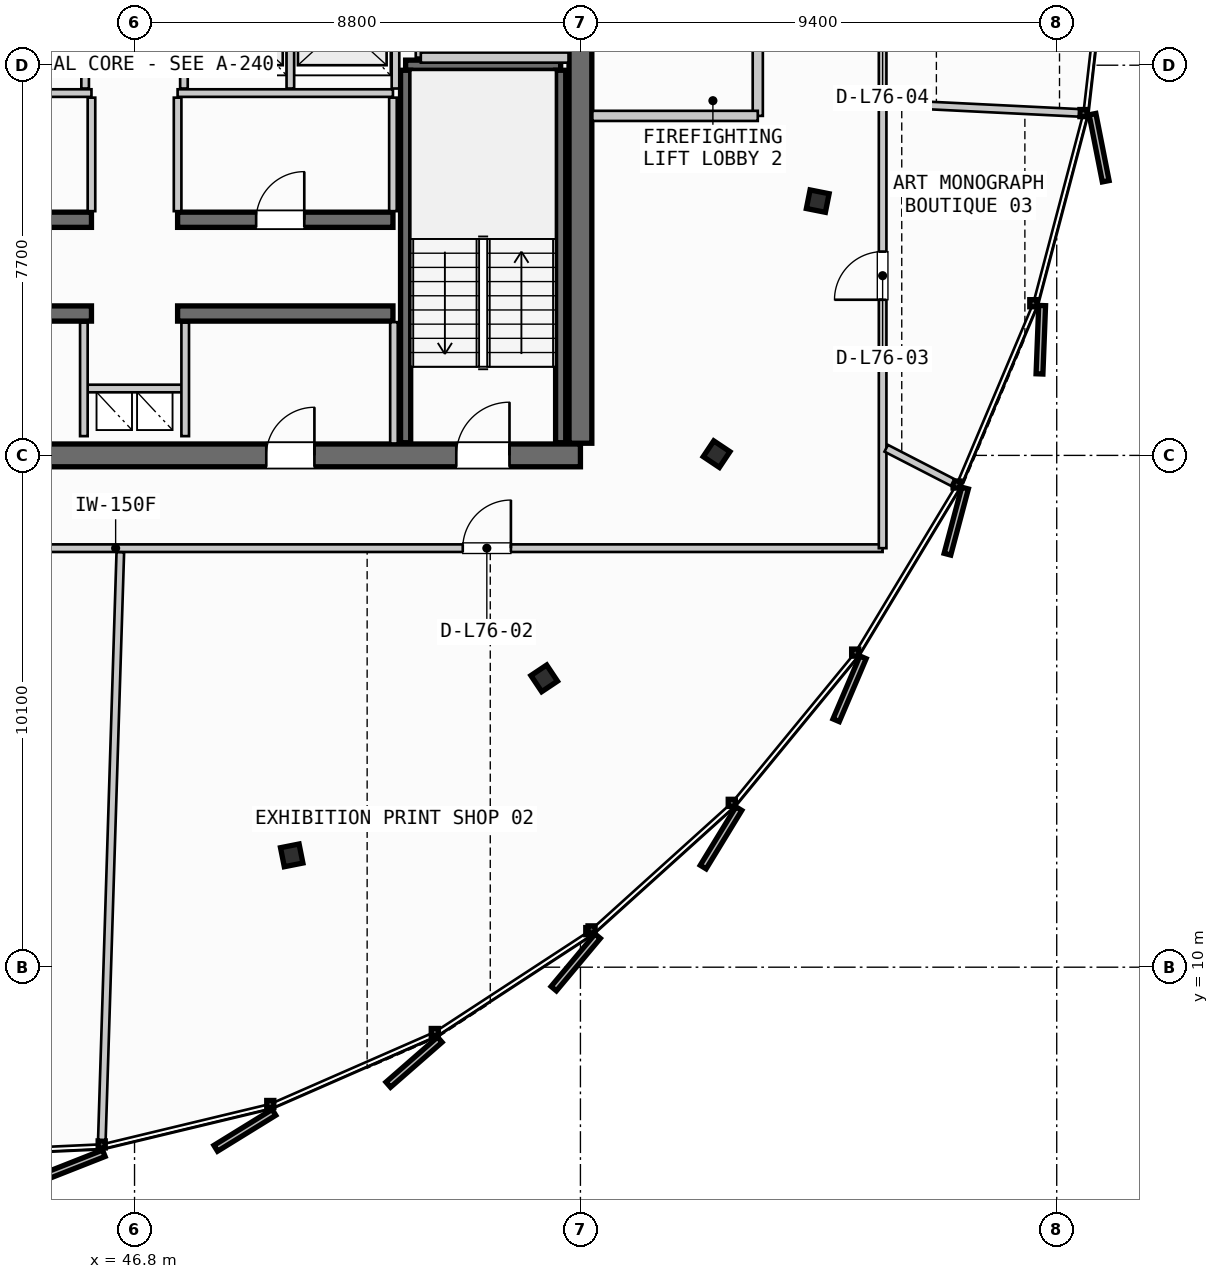
"""IFC4 building model, lengths in metres.
Left out: names, types, materials, properties, quantities, classifications, styles, units other than length and angle.
Written with IfcOpenShell. Run it as: python <this file> out.ifc"""

import sys

from ifc_helpers import new_model, si_unit, direction, frame, frame_2d, origin, origin_2d, place, context, subcontext, project, spatial, rectangle, i_section, extrude, source, transform, mapped, element, fill, save


model = new_model("IFC4")
c1 = context("Model", 3, precision=1e-05, world=origin(), true_north=direction((0.0, 1.0)))
c2 = subcontext(c1, "Body", "Model", "MODEL_VIEW")
j1 = project(units=[si_unit("LENGTHUNIT", "METRE"), si_unit("PLANEANGLEUNIT", "RADIAN")], contexts=[c1])
p1 = place(None, origin())
s1 = spatial("IfcSite", under=j1, at=p1, CompositionType="ELEMENT")
p2 = place(p1, origin())
s2 = spatial("IfcBuilding", under=s1, at=p2, CompositionType="ELEMENT")
p3 = place(p2, frame((0.0, 0.0, 287.05)))
s3 = spatial("IfcBuildingStorey", under=s2, at=p3, CompositionType="ELEMENT", Elevation=287.05)
p4 = place(p3, frame((38.0, 20.1, 0.0), z_axis=(0.0, 0.0, 1.0), x_axis=(1.0, 0.0, 0.0)))
e1 = element("IfcWall", 1, at=p4, inside=s3, PredefinedType="SHEAR", context=c2, shape_type="SweptSolid", body=[
    extrude(rectangle(XDim=17.6, YDim=0.45, at=frame_2d((8.8, 0.0))), origin(), (0.0, 0.0, 1.0), 3.21),
])
p5 = place(p4, frame((1.4, 0.0, 0.0)))
e2 = element("IfcOpeningElement", 2, at=p5, cuts=e1, PredefinedType="OPENING", context=c2, shape_type="SweptSolid", body=[
    extrude(rectangle(XDim=1.05, YDim=2.15, at=frame_2d((0.525, 1.075))), frame((0.0, 0.235, 0.0), z_axis=(0.0, -1.0, 0.0), x_axis=(1.0, 0.0, 0.0)), (0.0, 0.0, 1.0), 0.47),
])
p6 = place(p4, frame((15.15, 0.0, 0.0)))
e3 = element("IfcOpeningElement", 3, at=p6, cuts=e1, PredefinedType="OPENING", context=c2, shape_type="SweptSolid", body=[
    extrude(rectangle(XDim=1.05, YDim=2.15, at=frame_2d((0.525, 1.075))), frame((0.0, 0.235, 0.0), z_axis=(0.0, -1.0, 0.0), x_axis=(1.0, 0.0, 0.0)), (0.0, 0.0, 1.0), 0.47),
])
p7 = place(p4, frame((5.25, 0.0, 0.0)))
e4 = element("IfcOpeningElement", 4, at=p7, cuts=e1, PredefinedType="OPENING", context=c2, shape_type="SweptSolid", body=[
    extrude(rectangle(XDim=0.95, YDim=2.15, at=frame_2d((0.475, 1.075))), frame((0.0, 0.235, 0.0), z_axis=(0.0, -1.0, 0.0), x_axis=(1.0, 0.0, 0.0)), (0.0, 0.0, 1.0), 0.47),
])
p8 = place(p4, frame((11.4, 0.0, 0.0)))
e5 = element("IfcOpeningElement", 5, at=p8, cuts=e1, PredefinedType="OPENING", context=c2, shape_type="SweptSolid", body=[
    extrude(rectangle(XDim=0.95, YDim=2.15, at=frame_2d((0.475, 1.075))), frame((0.0, 0.235, 0.0), z_axis=(0.0, -1.0, 0.0), x_axis=(1.0, 0.0, 0.0)), (0.0, 0.0, 1.0), 0.47),
])
p9 = place(p3, frame((55.6, 20.34, 0.0), z_axis=(0.0, 0.0, 1.0), x_axis=(0.0, 1.0, 0.0)))
e6 = element("IfcWall", 6, at=p9, inside=s3, PredefinedType="SHEAR", context=c2, shape_type="SweptSolid", body=[
    extrude(rectangle(XDim=14.92, YDim=0.45, at=frame_2d((7.46, 0.0))), origin(), (0.0, 0.0, 1.0), 3.21),
])
p10 = place(p9, frame((12.71, 0.0, 0.0)))
e7 = element("IfcOpeningElement", 7, at=p10, cuts=e6, PredefinedType="OPENING", context=c2, shape_type="SweptSolid", body=[
    extrude(rectangle(XDim=1.05, YDim=2.15, at=frame_2d((0.525, 1.075))), frame((0.0, 0.235, 0.0), z_axis=(0.0, -1.0, 0.0), x_axis=(1.0, 0.0, 0.0)), (0.0, 0.0, 1.0), 0.47),
])
p11 = place(p9, frame((8.61, 0.0, 0.0)))
e8 = element("IfcOpeningElement", 8, at=p11, cuts=e6, PredefinedType="OPENING", context=c2, shape_type="SweptSolid", body=[
    extrude(rectangle(XDim=1.1, YDim=2.2, at=frame_2d((0.55, 1.1))), frame((0.0, 0.235, 0.0), z_axis=(0.0, -1.0, 0.0), x_axis=(1.0, 0.0, 0.0)), (0.0, 0.0, 1.0), 0.47),
])
for number, where, z_axis, x_axis in (
    (9, (41.7, 22.9, 0.0), (0.0, 0.0, 1.0), (1.0, 0.0, 0.0)),
    (10, (47.65, 22.9, 0.0), (0.0, 0.0, 1.0), (1.0, 0.0, 0.0)),
):
    element("IfcWall", number, at=place(p3, frame(where, z_axis=z_axis, x_axis=x_axis)), inside=s3, PredefinedType="SHEAR", context=c2, shape_type="SweptSolid", body=[
        extrude(rectangle(XDim=4.25, YDim=0.3, at=frame_2d((2.125, 0.0))), origin(), (0.0, 0.0, 1.0), 3.21),
    ])
p12 = place(p3, frame((41.7, 24.75, 0.0), z_axis=(0.0, 0.0, 1.0), x_axis=(1.0, 0.0, 0.0)))
e11 = element("IfcWall", 11, at=p12, inside=s3, PredefinedType="SHEAR", context=c2, shape_type="SweptSolid", body=[
    extrude(rectangle(XDim=4.25, YDim=0.3, at=frame_2d((2.125, 0.0))), origin(), (0.0, 0.0, 1.0), 3.21),
])
p13 = place(p12, frame((1.55, 0.0, 0.0)))
e12 = element("IfcOpeningElement", 12, at=p13, cuts=e11, PredefinedType="OPENING", context=c2, shape_type="SweptSolid", body=[
    extrude(rectangle(XDim=0.95, YDim=2.15, at=frame_2d((0.475, 1.075))), frame((0.0, 0.16, 0.0), z_axis=(0.0, -1.0, 0.0), x_axis=(1.0, 0.0, 0.0)), (0.0, 0.0, 1.0), 0.32),
])
p14 = place(p3, frame((47.65, 24.75, 0.0), z_axis=(0.0, 0.0, 1.0), x_axis=(1.0, 0.0, 0.0)))
e13 = element("IfcWall", 13, at=p14, inside=s3, PredefinedType="SHEAR", context=c2, shape_type="SweptSolid", body=[
    extrude(rectangle(XDim=4.25, YDim=0.3, at=frame_2d((2.125, 0.0))), origin(), (0.0, 0.0, 1.0), 3.21),
])
p15 = place(p14, frame((1.55, 0.0, 0.0)))
e14 = element("IfcOpeningElement", 14, at=p15, cuts=e13, PredefinedType="OPENING", context=c2, shape_type="SweptSolid", body=[
    extrude(rectangle(XDim=0.95, YDim=2.15, at=frame_2d((0.475, 1.075))), frame((0.0, 0.16, 0.0), z_axis=(0.0, -1.0, 0.0), x_axis=(1.0, 0.0, 0.0)), (0.0, 0.0, 1.0), 0.32),
])
m1 = source(origin(), c2, "Body", "SweptSolid", [
    extrude(i_section(OverallWidth=0.374, OverallDepth=0.383, WebThickness=0.017, FlangeThickness=0.026, FilletRadius=0.015, at=origin_2d()), origin(), (0.0, 0.0, 1.0), 3.21),
])
for number, where, z_axis, x_axis in (
    (15, (49.902, 12.207, 0.0), (0.0, 0.0, 1.0), (0.195, -0.981, 0.0)),
    (16, (54.885, 15.7, 0.0), (0.0, 0.0, 1.0), (0.556, -0.831, 0.0)),
    (17, (58.287, 20.125, 0.0), (0.0, 0.0, 1.0), (0.831, -0.556, 0.0)),
    (18, (60.284, 25.118, 0.0), (0.0, 0.0, 1.0), (0.981, -0.195, 0.0)),
):
    element("IfcColumn", number, at=place(p3, frame(where, z_axis=z_axis, x_axis=x_axis)), inside=s3, PredefinedType="COLUMN", context=c2, shape_type="MappedRepresentation", body=[
        mapped(m1, transform((0.0, 0.0, 0.0), scale=1.0)),
    ])
p16 = place(p3, frame((52.15, 27.8, 0.0), z_axis=(0.0, 0.0, 1.0), x_axis=(1.0, 0.0, 0.0)))
e19 = element("IfcWall", 19, at=p16, inside=s3, PredefinedType="SHEAR", context=c2, shape_type="SweptSolid", body=[
    extrude(rectangle(XDim=3.06, YDim=0.2, at=frame_2d((1.53, 0.0))), origin(), (0.0, 0.0, 1.0), 3.21),
])
for number, where, z_axis, x_axis in (
    (20, (55.21, 27.7, 0.0), (0.0, 0.0, 1.0), (0.0, -1.0, 0.0)),
    (21, (52.15, 20.35, 0.0), (0.0, 0.0, 1.0), (0.0, 1.0, 0.0)),
):
    element("IfcWall", number, at=place(p3, frame(where, z_axis=z_axis, x_axis=x_axis)), inside=s3, PredefinedType="SHEAR", context=c2, shape_type="SweptSolid", body=[
        extrude(rectangle(XDim=7.35, YDim=0.2, at=frame_2d((3.675, 0.0))), origin(), (0.0, 0.0, 1.0), 3.21),
    ])
p17 = place(p3, frame((45.8, 21.42, 0.0), z_axis=(0.0, 0.0, 1.0), x_axis=(1.0, 0.0, 0.0)))
e22 = element("IfcWall", 22, at=p17, inside=s3, PredefinedType="PARTITIONING", context=c2, shape_type="SweptSolid", body=[
    extrude(rectangle(XDim=2.0, YDim=0.15, at=frame_2d((1.0, 0.0))), origin(), (0.0, 0.0, 1.0), 2.315),
])
for number, where, z_axis, x_axis in (
    (23, (45.8, 20.48, 0.0), (0.0, 0.0, 1.0), (0.0, 1.0, 0.0)),
    (24, (47.8, 20.48, 0.0), (0.0, 0.0, 1.0), (0.0, 1.0, 0.0)),
):
    element("IfcWall", number, at=place(p3, frame(where, z_axis=z_axis, x_axis=x_axis)), inside=s3, PredefinedType="PARTITIONING", context=c2, shape_type="SweptSolid", body=[
        extrude(rectangle(XDim=2.24, YDim=0.15, at=frame_2d((1.12, 0.0))), origin(), (0.0, 0.0, 1.0), 2.315),
    ])
p18 = place(p3, frame((52.45, 27.95, 0.0), z_axis=(0.0, 0.0, 1.0), x_axis=(0.0, 1.0, 0.0)))
e25 = element("IfcWall", 25, at=p18, inside=s3, PredefinedType="PARTITIONING", context=c2, shape_type="SweptSolid", body=[
    extrude(rectangle(XDim=3.1, YDim=0.2, at=frame_2d((1.55, 0.0))), origin(), (0.0, 0.0, 1.0), 2.315),
])
p19 = place(p3, frame((52.45, 27.95, 0.0), z_axis=(0.0, 0.0, 1.0), x_axis=(1.0, 0.0, 0.0)))
e26 = element("IfcWall", 26, at=p19, inside=s3, PredefinedType="PARTITIONING", context=c2, shape_type="SweptSolid", body=[
    extrude(rectangle(XDim=2.915, YDim=0.2, at=frame_2d((1.458, 0.0))), origin(), (0.0, 0.0, 1.0), 2.315),
])
p20 = place(p3, frame((59.1, 26.8, 0.0), z_axis=(0.0, 0.0, 1.0), x_axis=(0.0, 1.0, 0.0)))
e27 = element("IfcWall", 27, at=p20, inside=s3, PredefinedType="PARTITIONING", context=c2, shape_type="SweptSolid", body=[
    extrude(rectangle(XDim=4.4, YDim=0.2, at=frame_2d((2.2, 0.0))), origin(), (0.0, 0.0, 1.0), 2.315),
])
p21 = place(p20, frame((1.65, 0.0, 0.0)))
e28 = element("IfcOpeningElement", 28, at=p21, cuts=e27, PredefinedType="OPENING", context=c2, shape_type="SweptSolid", body=[
    extrude(rectangle(XDim=1.05, YDim=2.15, at=frame_2d((0.525, 1.075))), frame((0.0, 0.11, 0.0), z_axis=(0.0, -1.0, 0.0), x_axis=(1.0, 0.0, 0.0)), (0.0, 0.0, 1.0), 0.22),
])
p22 = place(p3, frame((55.835, 26.8, 0.0), z_axis=(0.0, 0.0, 1.0), x_axis=(1.0, 0.0, 0.0)))
e29 = element("IfcWall", 29, at=p22, inside=s3, PredefinedType="PARTITIONING", context=c2, shape_type="SweptSolid", body=[
    extrude(rectangle(XDim=3.265, YDim=0.2, at=frame_2d((1.633, 0.0))), origin(), (0.0, 0.0, 1.0), 2.315),
])
p23 = place(p3, frame((51.92, 20.335, 0.0), z_axis=(0.0, 0.0, 1.0), x_axis=(0.0, 1.0, 0.0)))
e30 = element("IfcWall", 30, at=p23, inside=s3, PredefinedType="PARTITIONING", context=c2, shape_type="SweptSolid", body=[
    extrude(rectangle(XDim=2.395, YDim=0.15, at=frame_2d((1.198, 0.0))), origin(), (0.0, 0.0, 1.0), 2.315),
])
for number, where, z_axis, x_axis in (
    (31, (41.7, 27.25, 0.0), (0.0, 0.0, 1.0), (1.0, 0.0, 0.0)),
    (32, (47.65, 27.25, 0.0), (0.0, 0.0, 1.0), (1.0, 0.0, 0.0)),
):
    element("IfcWall", number, at=place(p3, frame(where, z_axis=z_axis, x_axis=x_axis)), inside=s3, PredefinedType="PARTITIONING", context=c2, shape_type="SweptSolid", body=[
        extrude(rectangle(XDim=4.25, YDim=0.15, at=frame_2d((2.125, 0.0))), origin(), (0.0, 0.0, 1.0), 2.315),
    ])
for number, where, z_axis, x_axis in (
    (33, (45.95, 24.92, 0.0), (0.0, 0.0, 1.0), (0.0, 1.0, 0.0)),
    (34, (47.65, 24.92, 0.0), (0.0, 0.0, 1.0), (0.0, 1.0, 0.0)),
    (35, (51.9, 24.92, 0.0), (0.0, 0.0, 1.0), (0.0, 1.0, 0.0)),
):
    element("IfcWall", number, at=place(p3, frame(where, z_axis=z_axis, x_axis=x_axis)), inside=s3, PredefinedType="PARTITIONING", context=c2, shape_type="SweptSolid", body=[
        extrude(rectangle(XDim=2.24, YDim=0.15, at=frame_2d((1.12, 0.0))), origin(), (0.0, 0.0, 1.0), 2.315),
    ])
for number, where, z_axis, x_axis in (
    (36, (45.825, 27.34, 0.0), (0.0, 0.0, 1.0), (0.0, 1.0, 0.0)),
    (37, (47.775, 27.34, 0.0), (0.0, 0.0, 1.0), (0.0, 1.0, 0.0)),
    (38, (49.875, 27.34, 0.0), (0.0, 0.0, 1.0), (0.0, 1.0, 0.0)),
    (39, (51.95, 27.34, 0.0), (0.0, 0.0, 1.0), (0.0, 1.0, 0.0)),
):
    element("IfcWall", number, at=place(p3, frame(where, z_axis=z_axis, x_axis=x_axis)), inside=s3, PredefinedType="PARTITIONING", context=c2, shape_type="SweptSolid", body=[
        extrude(rectangle(XDim=2.34, YDim=0.15, at=frame_2d((1.17, 0.0))), origin(), (0.0, 0.0, 1.0), 2.315),
    ])
p24 = place(p3, frame((31.29, 18.269, 0.0), z_axis=(0.0, 0.0, 1.0), x_axis=(1.0, 0.0, 0.0)))
e40 = element("IfcWall", 40, at=p24, inside=s3, PredefinedType="PARTITIONING", context=c2, shape_type="SweptSolid", body=[
    extrude(rectangle(XDim=30.274, YDim=0.15, at=frame_2d((15.137, 0.0))), origin(), (0.0, 0.0, 1.0), 2.315),
])
p25 = place(p24, frame((7.431, 0.0, 0.0)))
e41 = element("IfcOpeningElement", 41, at=p25, cuts=e40, PredefinedType="OPENING", context=c2, shape_type="SweptSolid", body=[
    extrude(rectangle(XDim=0.95, YDim=2.15, at=frame_2d((0.475, 1.075))), frame((0.0, 0.085, 0.0), z_axis=(0.0, -1.0, 0.0), x_axis=(1.0, 0.0, 0.0)), (0.0, 0.0, 1.0), 0.17),
])
p26 = place(p24, frame((21.988, 0.0, 0.0)))
e42 = element("IfcOpeningElement", 42, at=p26, cuts=e40, PredefinedType="OPENING", context=c2, shape_type="SweptSolid", body=[
    extrude(rectangle(XDim=0.95, YDim=2.15, at=frame_2d((0.475, 1.075))), frame((0.0, 0.085, 0.0), z_axis=(0.0, -1.0, 0.0), x_axis=(1.0, 0.0, 0.0)), (0.0, 0.0, 1.0), 0.17),
])
p27 = place(p3, frame((61.564, 18.269, 0.0), z_axis=(0.0, 0.0, 1.0), x_axis=(0.0, 1.0, 0.0)))
e43 = element("IfcWall", 43, at=p27, inside=s3, PredefinedType="PARTITIONING", context=c2, shape_type="SweptSolid", body=[
    extrude(rectangle(XDim=19.293, YDim=0.15, at=frame_2d((9.646, 0.0))), origin(), (0.0, 0.0, 1.0), 2.315),
])
p28 = place(p27, frame((4.903, 0.0, 0.0)))
e44 = element("IfcOpeningElement", 44, at=p28, cuts=e43, PredefinedType="OPENING", context=c2, shape_type="SweptSolid", body=[
    extrude(rectangle(XDim=0.95, YDim=2.15, at=frame_2d((0.475, 1.075))), frame((0.0, 0.085, 0.0), z_axis=(0.0, -1.0, 0.0), x_axis=(1.0, 0.0, 0.0)), (0.0, 0.0, 1.0), 0.17),
])
p29 = place(p27, frame((10.059, 0.0, 0.0)))
e45 = element("IfcOpeningElement", 45, at=p29, cuts=e43, PredefinedType="OPENING", context=c2, shape_type="SweptSolid", body=[
    extrude(rectangle(XDim=0.95, YDim=2.15, at=frame_2d((0.475, 1.075))), frame((0.0, 0.085, 0.0), z_axis=(0.0, -1.0, 0.0), x_axis=(1.0, 0.0, 0.0)), (0.0, 0.0, 1.0), 0.17),
])
p30 = place(p27, frame((15.756, 0.0, 0.0)))
e46 = element("IfcOpeningElement", 46, at=p30, cuts=e43, PredefinedType="OPENING", context=c2, shape_type="SweptSolid", body=[
    extrude(rectangle(XDim=0.95, YDim=2.15, at=frame_2d((0.475, 1.075))), frame((0.0, 0.085, 0.0), z_axis=(0.0, -1.0, 0.0), x_axis=(1.0, 0.0, 0.0)), (0.0, 0.0, 1.0), 0.17),
])
p31 = place(p3, frame((46.519, 18.189, 0.0), z_axis=(0.0, 0.0, 1.0), x_axis=(-0.031395702938, -0.99950703341, 0.0)))
e47 = element("IfcWall", 47, at=p31, inside=s3, PredefinedType="PARTITIONING", context=c2, shape_type="SweptSolid", body=[
    extrude(rectangle(XDim=11.602, YDim=0.15, at=frame_2d((5.801, 0.0))), origin(), (0.0, 0.0, 1.0), 2.315),
])
p32 = place(p3, frame((61.635, 20.241, 0.0), z_axis=(0.0, 0.0, 1.0), x_axis=(0.889062432136, -0.457785967199, 0.0)))
e48 = element("IfcWall", 48, at=p32, inside=s3, PredefinedType="PARTITIONING", context=c2, shape_type="SweptSolid", body=[
    extrude(rectangle(XDim=1.474, YDim=0.15, at=frame_2d((0.737, 0.0))), origin(), (0.0, 0.0, 1.0), 2.315),
])
p33 = place(p3, frame((61.644, 27.046, 0.0), z_axis=(0.0, 0.0, 1.0), x_axis=(0.998790354341, -0.049171415218, 0.0)))
e49 = element("IfcWall", 49, at=p33, inside=s3, PredefinedType="PARTITIONING", context=c2, shape_type="SweptSolid", body=[
    extrude(rectangle(XDim=3.798, YDim=0.15, at=frame_2d((1.899, 0.0))), origin(), (0.0, 0.0, 1.0), 2.315),
])
m2 = source(origin(), c2, "Body", "SweptSolid", [
    extrude(rectangle(XDim=1.05, YDim=2.15, at=frame_2d((0.525, 1.075))), frame((0.0, 0.025, 0.0), z_axis=(0.0, -1.0, 0.0), x_axis=(1.0, 0.0, 0.0)), (0.0, 0.0, 1.0), 0.05),
])
p34 = place(p6, origin())
e50 = element("IfcDoor", 50, at=p34, inside=s3, OperationType="SINGLE_SWING_RIGHT", PredefinedType="DOOR", context=c2, shape_type="MappedRepresentation", body=[
    mapped(m2, transform((0.0, 0.0, 0.0), scale=1.0)),
])
fill(e3, e50)
m3 = source(origin(), c2, "Body", "SweptSolid", [
    extrude(rectangle(XDim=0.95, YDim=2.15, at=frame_2d((0.475, 1.075))), frame((0.0, 0.025, 0.0), z_axis=(0.0, -1.0, 0.0), x_axis=(1.0, 0.0, 0.0)), (0.0, 0.0, 1.0), 0.05),
])
p35 = place(p8, origin())
e51 = element("IfcDoor", 51, at=p35, inside=s3, OperationType="SINGLE_SWING_RIGHT", PredefinedType="DOOR", context=c2, shape_type="MappedRepresentation", body=[
    mapped(m3, transform((0.0, 0.0, 0.0), scale=1.0)),
])
fill(e5, e51)
p36 = place(p15, origin())
e52 = element("IfcDoor", 52, at=p36, inside=s3, OperationType="SINGLE_SWING_RIGHT", PredefinedType="DOOR", context=c2, shape_type="MappedRepresentation", body=[
    mapped(m3, transform((0.0, 0.0, 0.0), scale=1.0)),
])
fill(e14, e52)
p37 = place(p26, origin())
e53 = element("IfcDoor", 53, at=p37, inside=s3, OperationType="SINGLE_SWING_RIGHT", PredefinedType="DOOR", context=c2, shape_type="MappedRepresentation", body=[
    mapped(m3, transform((0.0, 0.0, 0.0), scale=1.0)),
])
fill(e42, e53)
p38 = place(p28, origin())
e54 = element("IfcDoor", 54, at=p38, inside=s3, OperationType="SINGLE_SWING_LEFT", PredefinedType="DOOR", context=c2, shape_type="MappedRepresentation", body=[
    mapped(m3, transform((0.0, 0.0, 0.0), scale=1.0)),
])
fill(e44, e54)
save(model, sys.argv[1])
